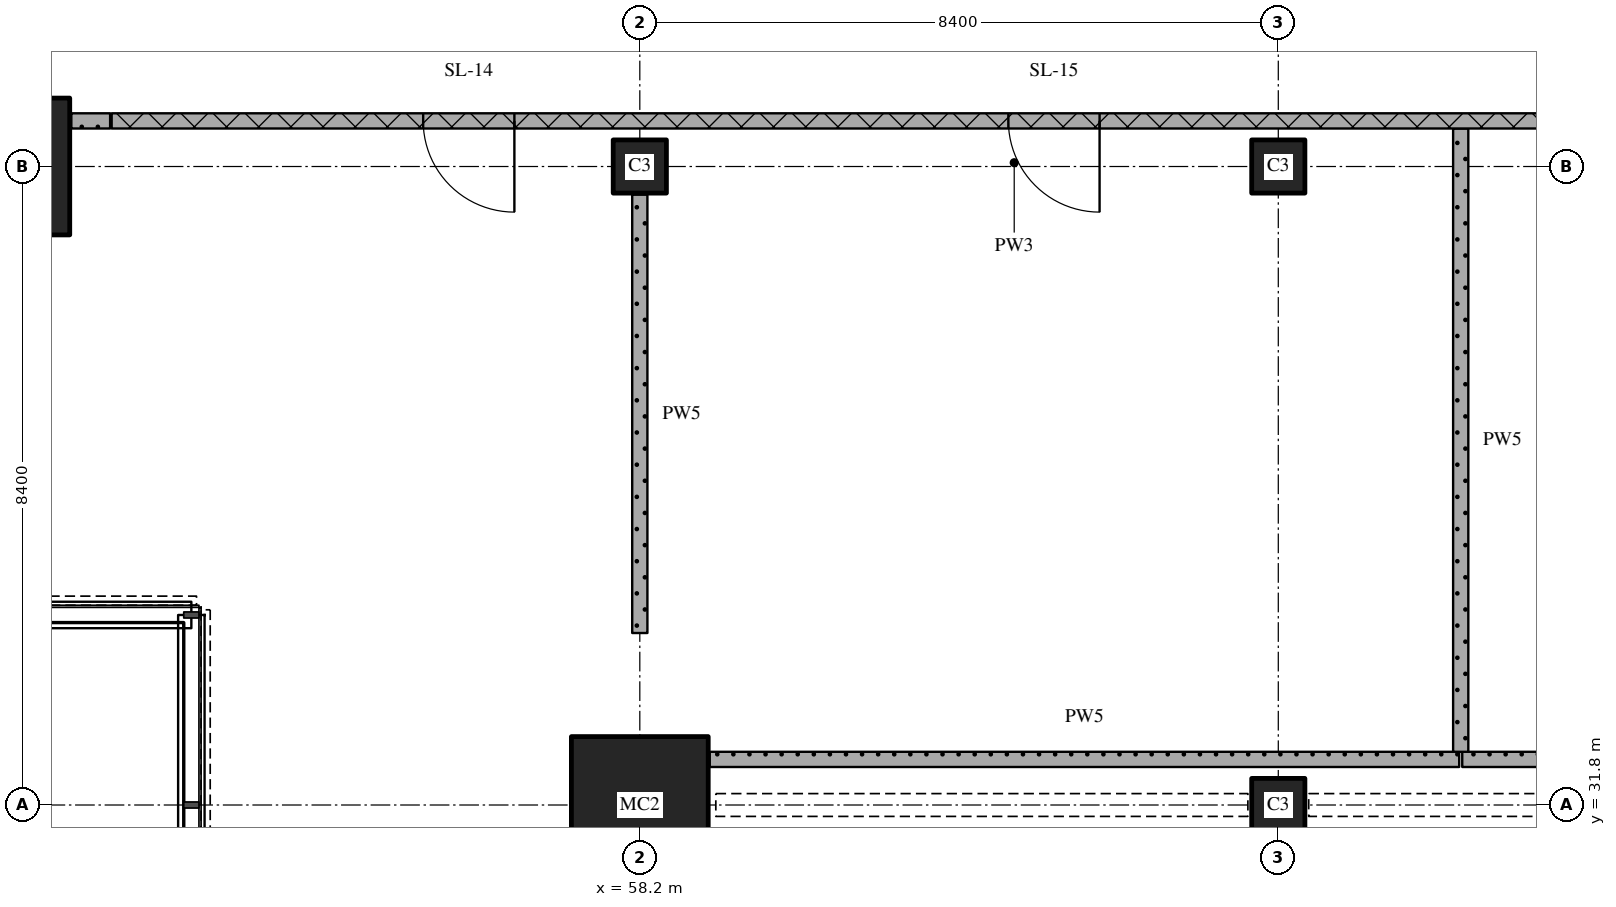
"""IFC4 building model, lengths in metres.
Left out: names, types, materials, properties, quantities, classifications, styles, units other than length and angle.
Written with IfcOpenShell. Run it as: python <this file> out.ifc"""

import sys

from ifc_helpers import new_model, si_unit, direction, frame, frame_2d, origin, origin_2d, place, context, subcontext, project, spatial, rectangle, extrude, element, fill, save


model = new_model("IFC4")
c1 = context("Model", 3, precision=1e-05, world=origin(), true_north=direction((0.0, 1.0)))
c2 = subcontext(c1, "Body", "Model", "MODEL_VIEW")
j1 = project(units=[si_unit("LENGTHUNIT", "METRE"), si_unit("PLANEANGLEUNIT", "RADIAN")], contexts=[c1])
p1 = place(None, origin())
s1 = spatial("IfcSite", under=j1, at=p1, CompositionType="ELEMENT")
p2 = place(p1, origin())
s2 = spatial("IfcBuilding", under=s1, at=p2, CompositionType="ELEMENT")
p3 = place(p2, frame((0.0, 0.0, 142.05)))
s3 = spatial("IfcBuildingStorey", under=s2, at=p3, CompositionType="ELEMENT", Elevation=142.05)
for number, where, z_axis, x_axis in (
    (1, (49.8, 40.2, 0.0), (0.0, 0.0, 1.0), (1.0, 0.0, 0.0)),
    (2, (58.2, 31.8, 0.0), (0.0, 0.0, 1.0), (1.0, 0.0, 0.0)),
):
    element("IfcColumn", number, at=place(p3, frame(where, z_axis=z_axis, x_axis=x_axis)), inside=s3, PredefinedType="COLUMN", context=c2, shape_type="SweptSolid", body=[
        extrude(rectangle(XDim=1.8, YDim=1.8, at=origin_2d()), origin(), (0.0, 0.0, 1.0), 5.4),
    ])
for number, where, z_axis, x_axis in (
    (3, (58.2, 40.2, 0.0), (0.0, 0.0, 1.0), (1.0, 0.0, 0.0)),
    (4, (66.6, 31.8, 0.0), (0.0, 0.0, 1.0), (1.0, 0.0, 0.0)),
    (5, (66.6, 40.2, 0.0), (0.0, 0.0, 1.0), (1.0, 0.0, 0.0)),
):
    element("IfcColumn", number, at=place(p3, frame(where, z_axis=z_axis, x_axis=x_axis)), inside=s3, PredefinedType="COLUMN", context=c2, shape_type="SweptSolid", body=[
        extrude(rectangle(XDim=0.7, YDim=0.7, at=origin_2d()), origin(), (0.0, 0.0, 1.0), 5.4),
    ])
p4 = place(p3, frame((59.12, 32.4, 0.0), z_axis=(0.0, 0.0, 1.0), x_axis=(1.0, 0.0, 0.0)))
e6 = element("IfcWall", 6, at=p4, inside=s3, PredefinedType="PARTITIONING", context=c2, shape_type="SweptSolid", body=[
    extrude(rectangle(XDim=9.86, YDim=0.2, at=frame_2d((4.93, 0.0))), origin(), (0.0, 0.0, 1.0), 5.12),
])
p5 = place(p3, frame((69.02, 32.4, 0.0), z_axis=(0.0, 0.0, 1.0), x_axis=(1.0, 0.0, 0.0)))
e7 = element("IfcWall", 7, at=p5, inside=s3, PredefinedType="PARTITIONING", context=c2, shape_type="SweptSolid", body=[
    extrude(rectangle(XDim=8.36, YDim=0.2, at=frame_2d((4.18, 0.0))), origin(), (0.0, 0.0, 1.0), 5.12),
])
p6 = place(p3, frame((75.0, 40.8, 0.0), z_axis=(0.0, 0.0, 1.0), x_axis=(-1.0, 0.0, 0.0)))
e8 = element("IfcWall", 8, at=p6, inside=s3, PredefinedType="PARTITIONING", context=c2, shape_type="SweptSolid", body=[
    extrude(rectangle(XDim=23.749, YDim=0.2, at=frame_2d((11.874, 0.0))), origin(), (0.0, 0.0, 1.0), 5.12),
])
p7 = place(p6, frame((1.2, 0.0, 0.0)))
e9 = element("IfcOpeningElement", 9, at=p7, cuts=e8, PredefinedType="OPENING", context=c2, shape_type="SweptSolid", body=[
    extrude(rectangle(XDim=1.2, YDim=2.1, at=frame_2d((0.6, 1.05))), frame((0.0, 0.11, 0.0), z_axis=(0.0, -1.0, 0.0), x_axis=(1.0, 0.0, 0.0)), (0.0, 0.0, 1.0), 0.22),
])
p8 = place(p6, frame((10.751, 0.0, 0.0)))
e10 = element("IfcOpeningElement", 10, at=p8, cuts=e8, PredefinedType="OPENING", context=c2, shape_type="SweptSolid", body=[
    extrude(rectangle(XDim=1.2, YDim=2.1, at=frame_2d((0.6, 1.05))), frame((0.0, 0.11, 0.0), z_axis=(0.0, -1.0, 0.0), x_axis=(1.0, 0.0, 0.0)), (0.0, 0.0, 1.0), 0.22),
])
p9 = place(p6, frame((18.45, 0.0, 0.0)))
e11 = element("IfcOpeningElement", 11, at=p9, cuts=e8, PredefinedType="OPENING", context=c2, shape_type="SweptSolid", body=[
    extrude(rectangle(XDim=1.2, YDim=2.1, at=frame_2d((0.6, 1.05))), frame((0.0, 0.11, 0.0), z_axis=(0.0, -1.0, 0.0), x_axis=(1.0, 0.0, 0.0)), (0.0, 0.0, 1.0), 0.22),
])
p10 = place(p3, frame((50.72, 40.8, 0.0), z_axis=(0.0, 0.0, 1.0), x_axis=(1.0, 0.0, 0.0)))
e12 = element("IfcWall", 12, at=p10, inside=s3, PredefinedType="PARTITIONING", context=c2, shape_type="SweptSolid", body=[
    extrude(rectangle(XDim=0.511, YDim=0.2, at=frame_2d((0.256, 0.0))), origin(), (0.0, 0.0, 1.0), 5.12),
])
p11 = place(p3, frame((58.2, 39.83, 0.0), z_axis=(0.0, 0.0, 1.0), x_axis=(0.0, -1.0, 0.0)))
e13 = element("IfcWall", 13, at=p11, inside=s3, PredefinedType="PARTITIONING", context=c2, shape_type="SweptSolid", body=[
    extrude(rectangle(XDim=5.767, YDim=0.2, at=frame_2d((2.884, 0.0))), origin(), (0.0, 0.0, 1.0), 5.12),
])
p12 = place(p3, frame((69.0, 40.7, 0.0), z_axis=(0.0, 0.0, 1.0), x_axis=(0.0, -1.0, 0.0)))
e14 = element("IfcWall", 14, at=p12, inside=s3, PredefinedType="PARTITIONING", context=c2, shape_type="SweptSolid", body=[
    extrude(rectangle(XDim=8.2, YDim=0.2, at=frame_2d((4.1, 0.0))), origin(), (0.0, 0.0, 1.0), 5.12),
])
p13 = place(p8, origin())
e15 = element("IfcDoor", 15, at=p13, inside=s3, OperationType="SINGLE_SWING_LEFT", PredefinedType="DOOR", context=c2, shape_type="SweptSolid", body=[
    extrude(rectangle(XDim=1.2, YDim=2.1, at=frame_2d((0.6, 1.05))), frame((0.0, 0.025, 0.0), z_axis=(0.0, -1.0, 0.0), x_axis=(1.0, 0.0, 0.0)), (0.0, 0.0, 1.0), 0.05),
])
fill(e10, e15)
p14 = place(p9, origin())
e16 = element("IfcDoor", 16, at=p14, inside=s3, OperationType="SINGLE_SWING_LEFT", PredefinedType="DOOR", context=c2, shape_type="SweptSolid", body=[
    extrude(rectangle(XDim=1.2, YDim=2.1, at=frame_2d((0.6, 1.05))), frame((0.0, 0.025, 0.0), z_axis=(0.0, -1.0, 0.0), x_axis=(1.0, 0.0, 0.0)), (0.0, 0.0, 1.0), 0.05),
])
fill(e11, e16)
save(model, sys.argv[1])
